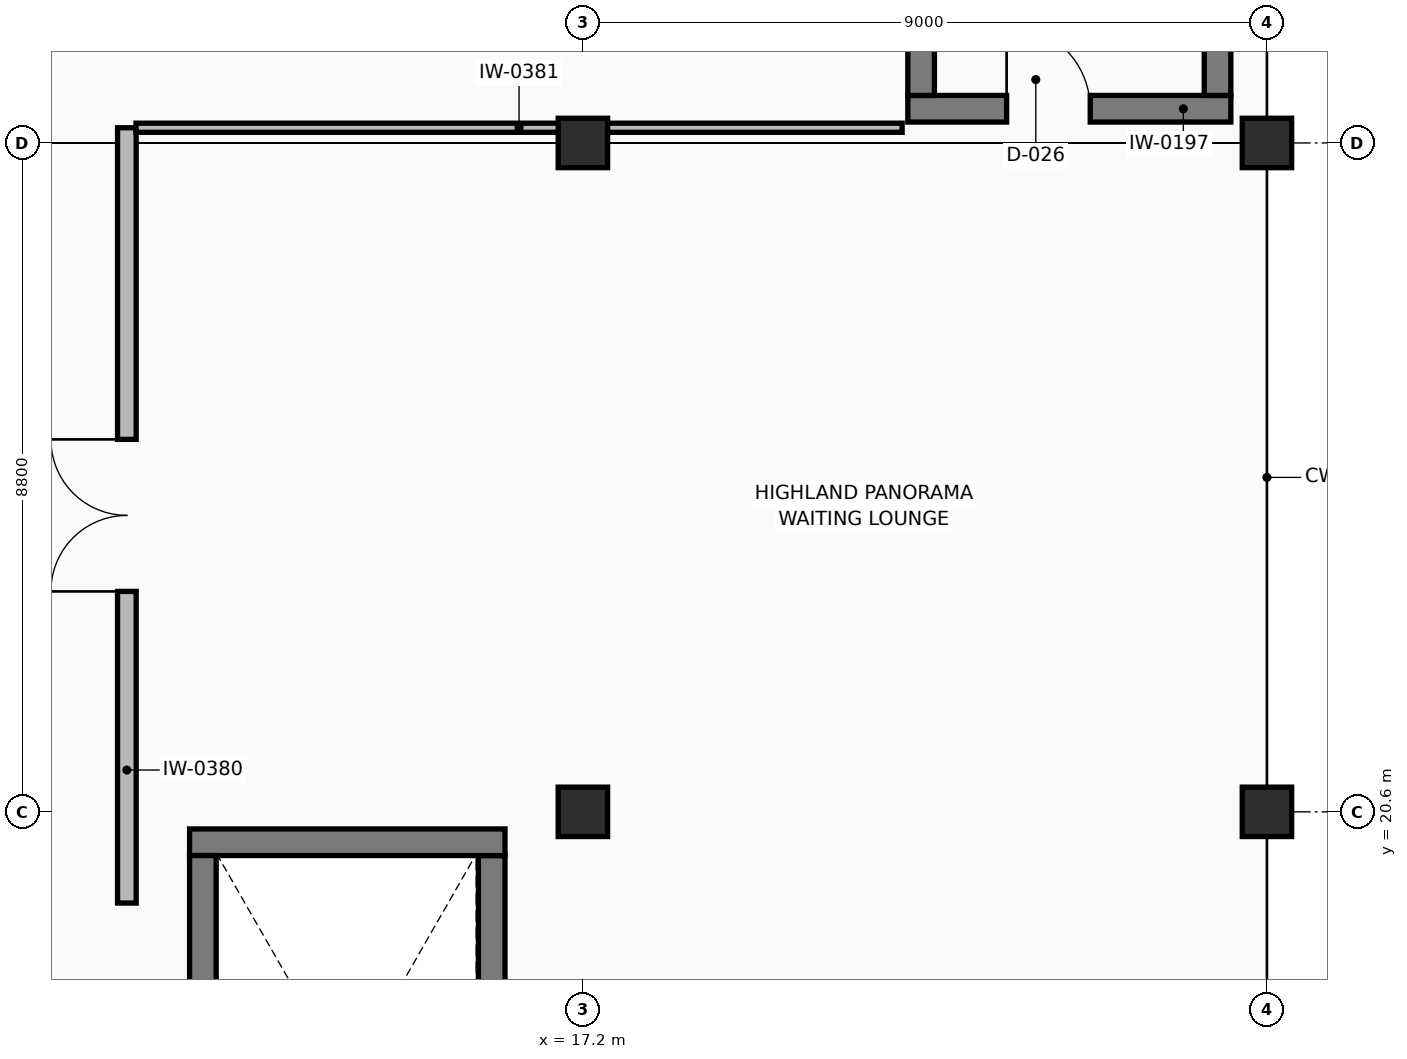
"""IFC4 building model, lengths in metres.
Left out: names, types, materials, properties, quantities, classifications, styles, units other than length and angle.
Written with IfcOpenShell. Run it as: python <this file> out.ifc"""

import sys

from ifc_helpers import new_model, si_unit, direction, frame, frame_2d, origin, origin_2d, place, context, subcontext, project, spatial, rectangle, extrude, element, fill, save


model = new_model("IFC4")
c1 = context("Model", 3, precision=1e-05, world=origin(), true_north=direction((0.0, 1.0)))
c2 = subcontext(c1, "Body", "Model", "MODEL_VIEW")
j1 = project(units=[si_unit("LENGTHUNIT", "METRE"), si_unit("PLANEANGLEUNIT", "RADIAN")], contexts=[c1])
p1 = place(None, origin())
s1 = spatial("IfcSite", under=j1, at=p1, CompositionType="ELEMENT")
p2 = place(p1, origin())
s2 = spatial("IfcBuilding", under=s1, at=p2, CompositionType="ELEMENT")
p3 = place(p2, frame((0.0, 0.0, 9.6)))
s3 = spatial("IfcBuildingStorey", under=s2, at=p3, CompositionType="ELEMENT", Elevation=9.6)
for number, where, z_axis, x_axis in (
    (1, (17.2, 20.6, 0.0), (0.0, 0.0, 1.0), (1.0, 0.0, 0.0)),
    (2, (17.2, 29.4, 0.0), (0.0, 0.0, 1.0), (1.0, 0.0, 0.0)),
    (3, (26.2, 20.6, 0.0), (0.0, 0.0, 1.0), (1.0, 0.0, 0.0)),
    (4, (26.2, 29.4, 0.0), (0.0, 0.0, 1.0), (1.0, 0.0, 0.0)),
):
    element("IfcColumn", number, at=place(p3, frame(where, z_axis=z_axis, x_axis=x_axis)), inside=s3, PredefinedType="COLUMN", context=c2, shape_type="SweptSolid", body=[
        extrude(rectangle(XDim=0.65, YDim=0.65, at=origin_2d()), origin(), (0.0, 0.0, 1.0), 4.8),
    ])
p4 = place(p3, frame((21.475, 29.85, 0.0), z_axis=(0.0, 0.0, 1.0), x_axis=(1.0, 0.0, 0.0)))
e5 = element("IfcWall", 5, at=p4, inside=s3, PredefinedType="SHEAR", context=c2, shape_type="SweptSolid", body=[
    extrude(rectangle(XDim=4.25, YDim=0.35, at=frame_2d((2.125, 0.0))), origin(), (0.0, 0.0, 1.0), 4.49),
])
p5 = place(p4, frame((1.3, 0.0, 0.0)))
e6 = element("IfcOpeningElement", 6, at=p5, cuts=e5, PredefinedType="OPENING", context=c2, shape_type="SweptSolid", body=[
    extrude(rectangle(XDim=1.1, YDim=2.2, at=frame_2d((0.55, 1.1))), frame((0.0, 0.185, 0.0), z_axis=(0.0, -1.0, 0.0), x_axis=(1.0, 0.0, 0.0)), (0.0, 0.0, 1.0), 0.37),
])
for number, where, z_axis, x_axis in (
    (7, (25.55, 30.025, 0.0), (0.0, 0.0, 1.0), (0.0, 1.0, 0.0)),
    (8, (21.65, 37.475, 0.0), (0.0, 0.0, 1.0), (0.0, -1.0, 0.0)),
):
    element("IfcWall", number, at=place(p3, frame(where, z_axis=z_axis, x_axis=x_axis)), inside=s3, PredefinedType="SHEAR", context=c2, shape_type="SweptSolid", body=[
        extrude(rectangle(XDim=7.45, YDim=0.35, at=frame_2d((3.725, 0.0))), origin(), (0.0, 0.0, 1.0), 4.49),
    ])
p6 = place(p3, frame((16.0, 12.425, 0.0), z_axis=(0.0, 0.0, 1.0), x_axis=(0.0, 1.0, 0.0)))
e9 = element("IfcWall", 9, at=p6, inside=s3, PredefinedType="SHEAR", context=c2, shape_type="SweptSolid", body=[
    extrude(rectangle(XDim=7.6, YDim=0.35, at=frame_2d((3.8, 0.0))), origin(), (0.0, 0.0, 1.0), 4.49),
])
p7 = place(p6, frame((0.35, 0.0, 0.0)))
e10 = element("IfcOpeningElement", 10, at=p7, cuts=e9, PredefinedType="OPENING", context=c2, shape_type="SweptSolid", body=[
    extrude(rectangle(XDim=1.1, YDim=2.2, at=frame_2d((0.55, 1.1))), frame((0.0, 0.185, 0.0), z_axis=(0.0, -1.0, 0.0), x_axis=(1.0, 0.0, 0.0)), (0.0, 0.0, 1.0), 0.37),
])
p8 = place(p3, frame((16.175, 20.2, 0.0), z_axis=(0.0, 0.0, 1.0), x_axis=(-1.0, 0.0, 0.0)))
e11 = element("IfcWall", 11, at=p8, inside=s3, PredefinedType="SHEAR", context=c2, shape_type="SweptSolid", body=[
    extrude(rectangle(XDim=4.15, YDim=0.35, at=frame_2d((2.075, 0.0))), origin(), (0.0, 0.0, 1.0), 4.49),
])
p9 = place(p3, frame((12.2, 20.025, 0.0), z_axis=(0.0, 0.0, 1.0), x_axis=(0.0, -1.0, 0.0)))
e12 = element("IfcWall", 12, at=p9, inside=s3, PredefinedType="SHEAR", context=c2, shape_type="SweptSolid", body=[
    extrude(rectangle(XDim=7.6, YDim=0.35, at=frame_2d((3.8, 0.0))), origin(), (0.0, 0.0, 1.0), 4.49),
])
p10 = place(p3, frame((11.2, 19.4, 0.0), z_axis=(0.0, 0.0, 1.0), x_axis=(0.0, 1.0, 0.0)))
e13 = element("IfcWall", 13, at=p10, inside=s3, PredefinedType="PARTITIONING", context=c2, shape_type="SweptSolid", body=[
    extrude(rectangle(XDim=10.2, YDim=0.245, at=frame_2d((5.1, 0.0))), origin(), (0.0, 0.0, 1.0), 3.6),
])
p11 = place(p10, frame((4.1, 0.0, 0.0)))
e14 = element("IfcOpeningElement", 14, at=p11, cuts=e13, PredefinedType="OPENING", context=c2, shape_type="SweptSolid", body=[
    extrude(rectangle(XDim=2.0, YDim=2.4, at=frame_2d((1.0, 1.2))), frame((0.0, 0.133, 0.0), z_axis=(0.0, -1.0, 0.0), x_axis=(1.0, 0.0, 0.0)), (0.0, 0.0, 1.0), 0.265),
])
p12 = place(p3, frame((11.32, 29.6, 0.0), z_axis=(0.0, 0.0, 1.0), x_axis=(1.0, 0.0, 0.0)))
e15 = element("IfcWall", 15, at=p12, inside=s3, PredefinedType="PARTITIONING", context=c2, shape_type="SweptSolid", body=[
    extrude(rectangle(XDim=10.08, YDim=0.12, at=frame_2d((5.04, 0.0))), origin(), (0.0, 0.0, 1.0), 3.6),
])
p13 = place(p5, origin())
e16 = element("IfcDoor", 16, at=p13, inside=s3, OperationType="SINGLE_SWING_LEFT", PredefinedType="DOOR", context=c2, shape_type="SweptSolid", body=[
    extrude(rectangle(XDim=1.1, YDim=2.2, at=frame_2d((0.55, 1.1))), frame((0.0, 0.025, 0.0), z_axis=(0.0, -1.0, 0.0), x_axis=(1.0, 0.0, 0.0)), (0.0, 0.0, 1.0), 0.05),
])
fill(e6, e16)
p14 = place(p11, origin())
e17 = element("IfcDoor", 17, at=p14, inside=s3, OperationType="DOUBLE_DOOR_SINGLE_SWING", PredefinedType="DOOR", context=c2, shape_type="SweptSolid", body=[
    extrude(rectangle(XDim=2.0, YDim=2.4, at=frame_2d((1.0, 1.2))), frame((0.0, 0.025, 0.0), z_axis=(0.0, -1.0, 0.0), x_axis=(1.0, 0.0, 0.0)), (0.0, 0.0, 1.0), 0.05),
])
fill(e14, e17)
save(model, sys.argv[1])
